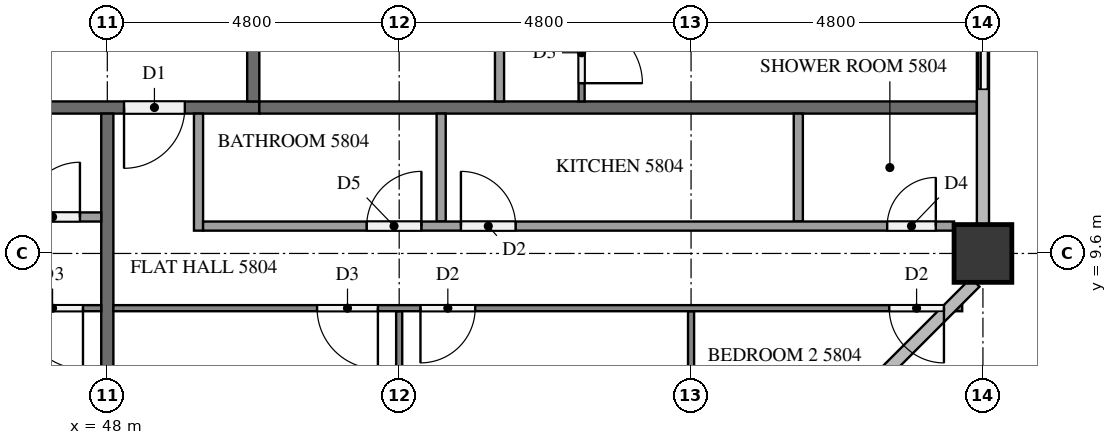
"""IFC4 building model, lengths in metres.
Left out: names, types, materials, properties, quantities, classifications, styles, units other than length and angle.
Written with IfcOpenShell. Run it as: python <this file> out.ifc"""

import sys

from ifc_helpers import new_model, si_unit, direction, frame, frame_2d, origin, origin_2d, place, context, subcontext, project, spatial, rectangle, extrude, element, fill, save


model = new_model("IFC4")
c1 = context("Model", 3, precision=1e-05, world=origin(), true_north=direction((0.0, 1.0)))
c2 = subcontext(c1, "Body", "Model", "MODEL_VIEW")
j1 = project(units=[si_unit("LENGTHUNIT", "METRE"), si_unit("PLANEANGLEUNIT", "RADIAN")], contexts=[c1])
p1 = place(None, origin())
s1 = spatial("IfcSite", under=j1, at=p1, CompositionType="ELEMENT")
p2 = place(p1, origin())
s2 = spatial("IfcBuilding", under=s1, at=p2, CompositionType="ELEMENT")
p3 = place(p2, frame((0.0, 0.0, 222.8)))
s3 = spatial("IfcBuildingStorey", under=s2, at=p3, CompositionType="ELEMENT", Elevation=222.8)
p4 = place(p3, frame((62.4, 9.6, 0.0), z_axis=(0.0, 0.0, 1.0), x_axis=(1.0, 0.0, 0.0)))
e1 = element("IfcColumn", 1, at=p4, inside=s3, PredefinedType="COLUMN", context=c2, shape_type="SweptSolid", body=[
    extrude(rectangle(XDim=0.95, YDim=0.95, at=origin_2d()), origin(), (0.0, 0.0, 1.0), 3.2),
])
p5 = place(p3, frame((62.4, 12.0, 0.0), z_axis=(0.0, 0.0, 1.0), x_axis=(0.0, 1.0, 0.0)))
e2 = element("IfcWall", 2, at=p5, inside=s3, PredefinedType="SOLIDWALL", context=c2, shape_type="SweptSolid", body=[
    extrude(rectangle(XDim=2.4, YDim=0.15, at=frame_2d((1.2, 0.0))), origin(), (0.0, 0.0, 1.0), 3.2),
])
p6 = place(p5, frame((0.3, 0.0, 0.0)))
e3 = element("IfcOpeningElement", 3, at=p6, cuts=e2, PredefinedType="OPENING", context=c2, shape_type="SweptSolid", body=[
    extrude(rectangle(XDim=1.8, YDim=2.4, at=frame_2d((0.9, 1.2))), frame((0.0, 0.085, 0.0), z_axis=(0.0, -1.0, 0.0), x_axis=(1.0, 0.0, 0.0)), (0.0, 0.0, 1.0), 0.17),
])
p7 = place(p3, frame((50.5, 12.0, 0.0), z_axis=(0.0, 0.0, 1.0), x_axis=(-1.0, 0.0, 0.0)))
e4 = element("IfcWall", 4, at=p7, inside=s3, PredefinedType="PARTITIONING", context=c2, shape_type="SweptSolid", body=[
    extrude(rectangle(XDim=38.6, YDim=0.2, at=frame_2d((19.3, 0.0))), origin(), (0.0, 0.0, 1.0), 3.2),
])
p8 = place(p7, frame((36.375, 0.0, 0.0)))
e5 = element("IfcOpeningElement", 5, at=p8, cuts=e4, PredefinedType="OPENING", context=c2, shape_type="SweptSolid", body=[
    extrude(rectangle(XDim=1.0, YDim=2.1, at=frame_2d((0.5, 1.05))), frame((0.0, 0.11, 0.0), z_axis=(0.0, -1.0, 0.0), x_axis=(1.0, 0.0, 0.0)), (0.0, 0.0, 1.0), 0.22),
])
p9 = place(p7, frame((34.825, 0.0, 0.0)))
e6 = element("IfcOpeningElement", 6, at=p9, cuts=e4, PredefinedType="OPENING", context=c2, shape_type="SweptSolid", body=[
    extrude(rectangle(XDim=1.0, YDim=2.1, at=frame_2d((0.5, 1.05))), frame((0.0, 0.11, 0.0), z_axis=(0.0, -1.0, 0.0), x_axis=(1.0, 0.0, 0.0)), (0.0, 0.0, 1.0), 0.22),
])
p10 = place(p7, frame((20.375, 0.0, 0.0)))
e7 = element("IfcOpeningElement", 7, at=p10, cuts=e4, PredefinedType="OPENING", context=c2, shape_type="SweptSolid", body=[
    extrude(rectangle(XDim=1.1, YDim=2.1, at=frame_2d((0.55, 1.05))), frame((0.0, 0.11, 0.0), z_axis=(0.0, -1.0, 0.0), x_axis=(1.0, 0.0, 0.0)), (0.0, 0.0, 1.0), 0.22),
])
p11 = place(p7, frame((1.225, 0.0, 0.0)))
e8 = element("IfcOpeningElement", 8, at=p11, cuts=e4, PredefinedType="OPENING", context=c2, shape_type="SweptSolid", body=[
    extrude(rectangle(XDim=1.0, YDim=2.1, at=frame_2d((0.5, 1.05))), frame((0.0, 0.11, 0.0), z_axis=(0.0, -1.0, 0.0), x_axis=(1.0, 0.0, 0.0)), (0.0, 0.0, 1.0), 0.22),
])
p12 = place(p3, frame((50.4, 40.7, 0.0), z_axis=(0.0, 0.0, 1.0), x_axis=(0.0, -1.0, 0.0)))
e9 = element("IfcWall", 9, at=p12, inside=s3, PredefinedType="PARTITIONING", context=c2, shape_type="SweptSolid", body=[
    extrude(rectangle(XDim=28.6, YDim=0.2, at=frame_2d((14.3, 0.0))), origin(), (0.0, 0.0, 1.0), 3.2),
])
p13 = place(p12, frame((21.775, 0.0, 0.0)))
e10 = element("IfcOpeningElement", 10, at=p13, cuts=e9, PredefinedType="OPENING", context=c2, shape_type="SweptSolid", body=[
    extrude(rectangle(XDim=1.0, YDim=2.1, at=frame_2d((0.5, 1.05))), frame((0.0, 0.11, 0.0), z_axis=(0.0, -1.0, 0.0), x_axis=(1.0, 0.0, 0.0)), (0.0, 0.0, 1.0), 0.22),
])
p14 = place(p12, frame((7.375, 0.0, 0.0)))
e11 = element("IfcOpeningElement", 11, at=p14, cuts=e9, PredefinedType="OPENING", context=c2, shape_type="SweptSolid", body=[
    extrude(rectangle(XDim=1.0, YDim=2.1, at=frame_2d((0.5, 1.05))), frame((0.0, 0.11, 0.0), z_axis=(0.0, -1.0, 0.0), x_axis=(1.0, 0.0, 0.0)), (0.0, 0.0, 1.0), 0.22),
])
p15 = place(p12, frame((0.175, 0.0, 0.0)))
e12 = element("IfcOpeningElement", 12, at=p15, cuts=e9, PredefinedType="OPENING", context=c2, shape_type="SweptSolid", body=[
    extrude(rectangle(XDim=1.0, YDim=2.1, at=frame_2d((0.5, 1.05))), frame((0.0, 0.11, 0.0), z_axis=(0.0, -1.0, 0.0), x_axis=(1.0, 0.0, 0.0)), (0.0, 0.0, 1.0), 0.22),
])
p16 = place(p3, frame((48.0, 11.9, 0.0), z_axis=(0.0, 0.0, 1.0), x_axis=(0.0, -1.0, 0.0)))
e13 = element("IfcWall", 13, at=p16, inside=s3, PredefinedType="PARTITIONING", context=c2, shape_type="SweptSolid", body=[
    extrude(rectangle(XDim=6.775, YDim=0.2, at=frame_2d((3.387, 0.0))), origin(), (0.0, 0.0, 1.0), 3.2),
])
p17 = place(p3, frame((50.5, 12.0, 0.0), z_axis=(0.0, 0.0, 1.0), x_axis=(1.0, 0.0, 0.0)))
e14 = element("IfcWall", 14, at=p17, inside=s3, PredefinedType="PARTITIONING", context=c2, shape_type="SweptSolid", body=[
    extrude(rectangle(XDim=11.8, YDim=0.2, at=frame_2d((5.9, 0.0))), origin(), (0.0, 0.0, 1.0), 3.2),
])
p18 = place(p3, frame((47.9, 8.7, 0.0), z_axis=(0.0, 0.0, 1.0), x_axis=(-1.0, 0.0, 0.0)))
e15 = element("IfcWall", 15, at=p18, inside=s3, PredefinedType="PARTITIONING", context=c2, shape_type="SweptSolid", body=[
    extrude(rectangle(XDim=19.0, YDim=0.1, at=frame_2d((9.5, 0.0))), origin(), (0.0, 0.0, 1.0), 3.2),
])
p19 = place(p18, frame((17.8, 0.0, 0.0)))
e16 = element("IfcOpeningElement", 16, at=p19, cuts=e15, PredefinedType="OPENING", context=c2, shape_type="SweptSolid", body=[
    extrude(rectangle(XDim=0.9, YDim=2.1, at=frame_2d((0.45, 1.05))), frame((0.0, 0.06, 0.0), z_axis=(0.0, -1.0, 0.0), x_axis=(1.0, 0.0, 0.0)), (0.0, 0.0, 1.0), 0.12),
])
p20 = place(p18, frame((9.85, 0.0, 0.0)))
e17 = element("IfcOpeningElement", 17, at=p20, cuts=e15, PredefinedType="OPENING", context=c2, shape_type="SweptSolid", body=[
    extrude(rectangle(XDim=0.9, YDim=2.1, at=frame_2d((0.45, 1.05))), frame((0.0, 0.06, 0.0), z_axis=(0.0, -1.0, 0.0), x_axis=(1.0, 0.0, 0.0)), (0.0, 0.0, 1.0), 0.12),
])
p21 = place(p18, frame((8.25, 0.0, 0.0)))
e18 = element("IfcOpeningElement", 18, at=p21, cuts=e15, PredefinedType="OPENING", context=c2, shape_type="SweptSolid", body=[
    extrude(rectangle(XDim=0.9, YDim=2.1, at=frame_2d((0.45, 1.05))), frame((0.0, 0.06, 0.0), z_axis=(0.0, -1.0, 0.0), x_axis=(1.0, 0.0, 0.0)), (0.0, 0.0, 1.0), 0.12),
])
p22 = place(p18, frame((0.3, 0.0, 0.0)))
e19 = element("IfcOpeningElement", 19, at=p22, cuts=e15, PredefinedType="OPENING", context=c2, shape_type="SweptSolid", body=[
    extrude(rectangle(XDim=1.0, YDim=2.1, at=frame_2d((0.5, 1.05))), frame((0.0, 0.06, 0.0), z_axis=(0.0, -1.0, 0.0), x_axis=(1.0, 0.0, 0.0)), (0.0, 0.0, 1.0), 0.12),
])
p23 = place(p3, frame((30.375, 10.2, 0.0), z_axis=(0.0, 0.0, 1.0), x_axis=(1.0, 0.0, 0.0)))
e20 = element("IfcWall", 20, at=p23, inside=s3, PredefinedType="PARTITIONING", context=c2, shape_type="SweptSolid", body=[
    extrude(rectangle(XDim=17.525, YDim=0.15, at=frame_2d((8.762, 0.0))), origin(), (0.0, 0.0, 1.0), 3.2),
])
p24 = place(p23, frame((0.3, 0.0, 0.0)))
e21 = element("IfcOpeningElement", 21, at=p24, cuts=e20, PredefinedType="OPENING", context=c2, shape_type="SweptSolid", body=[
    extrude(rectangle(XDim=0.9, YDim=2.1, at=frame_2d((0.45, 1.05))), frame((0.0, 0.085, 0.0), z_axis=(0.0, -1.0, 0.0), x_axis=(1.0, 0.0, 0.0)), (0.0, 0.0, 1.0), 0.17),
])
p25 = place(p23, frame((8.733, 0.0, 0.0)))
e22 = element("IfcOpeningElement", 22, at=p25, cuts=e20, PredefinedType="OPENING", context=c2, shape_type="SweptSolid", body=[
    extrude(rectangle(XDim=0.8, YDim=2.1, at=frame_2d((0.4, 1.05))), frame((0.0, 0.085, 0.0), z_axis=(0.0, -1.0, 0.0), x_axis=(1.0, 0.0, 0.0)), (0.0, 0.0, 1.0), 0.17),
])
p26 = place(p23, frame((10.183, 0.0, 0.0)))
e23 = element("IfcOpeningElement", 23, at=p26, cuts=e20, PredefinedType="OPENING", context=c2, shape_type="SweptSolid", body=[
    extrude(rectangle(XDim=0.8, YDim=2.1, at=frame_2d((0.4, 1.05))), frame((0.0, 0.085, 0.0), z_axis=(0.0, -1.0, 0.0), x_axis=(1.0, 0.0, 0.0)), (0.0, 0.0, 1.0), 0.17),
])
p27 = place(p23, frame((16.275, 0.0, 0.0)))
e24 = element("IfcOpeningElement", 24, at=p27, cuts=e20, PredefinedType="OPENING", context=c2, shape_type="SweptSolid", body=[
    extrude(rectangle(XDim=0.9, YDim=2.1, at=frame_2d((0.45, 1.05))), frame((0.0, 0.085, 0.0), z_axis=(0.0, -1.0, 0.0), x_axis=(1.0, 0.0, 0.0)), (0.0, 0.0, 1.0), 0.17),
])
p28 = place(p3, frame((52.8, 8.65, 0.0), z_axis=(0.0, 0.0, 1.0), x_axis=(0.0, -1.0, 0.0)))
e25 = element("IfcWall", 25, at=p28, inside=s3, PredefinedType="PARTITIONING", context=c2, shape_type="SweptSolid", body=[
    extrude(rectangle(XDim=3.75, YDim=0.1, at=frame_2d((1.875, 0.0))), origin(), (0.0, 0.0, 1.0), 3.2),
])
p29 = place(p3, frame((57.6, 8.65, 0.0), z_axis=(0.0, 0.0, 1.0), x_axis=(0.0, -1.0, 0.0)))
e26 = element("IfcWall", 26, at=p29, inside=s3, PredefinedType="PARTITIONING", context=c2, shape_type="SweptSolid", body=[
    extrude(rectangle(XDim=3.375, YDim=0.1, at=frame_2d((1.688, 0.0))), origin(), (0.0, 0.0, 1.0), 3.2),
])
p30 = place(p3, frame((62.059, 8.7, 0.0), z_axis=(0.0, 0.0, 1.0), x_axis=(-1.0, 0.0, 0.0)))
e27 = element("IfcWall", 27, at=p30, inside=s3, PredefinedType="PARTITIONING", context=c2, shape_type="SweptSolid", body=[
    extrude(rectangle(XDim=13.959, YDim=0.1, at=frame_2d((6.979, 0.0))), origin(), (0.0, 0.0, 1.0), 3.2),
])
p31 = place(p30, frame((9.609, 0.0, 0.0)))
e28 = element("IfcOpeningElement", 28, at=p31, cuts=e27, PredefinedType="OPENING", context=c2, shape_type="SweptSolid", body=[
    extrude(rectangle(XDim=1.0, YDim=2.1, at=frame_2d((0.5, 1.05))), frame((0.0, 0.06, 0.0), z_axis=(0.0, -1.0, 0.0), x_axis=(1.0, 0.0, 0.0)), (0.0, 0.0, 1.0), 0.12),
])
p32 = place(p30, frame((8.009, 0.0, 0.0)))
e29 = element("IfcOpeningElement", 29, at=p32, cuts=e27, PredefinedType="OPENING", context=c2, shape_type="SweptSolid", body=[
    extrude(rectangle(XDim=0.9, YDim=2.1, at=frame_2d((0.45, 1.05))), frame((0.0, 0.06, 0.0), z_axis=(0.0, -1.0, 0.0), x_axis=(1.0, 0.0, 0.0)), (0.0, 0.0, 1.0), 0.12),
])
p33 = place(p30, frame((0.3, 0.0, 0.0)))
e30 = element("IfcOpeningElement", 30, at=p33, cuts=e27, PredefinedType="OPENING", context=c2, shape_type="SweptSolid", body=[
    extrude(rectangle(XDim=0.9, YDim=2.1, at=frame_2d((0.45, 1.05))), frame((0.0, 0.06, 0.0), z_axis=(0.0, -1.0, 0.0), x_axis=(1.0, 0.0, 0.0)), (0.0, 0.0, 1.0), 0.12),
])
for number, where, z_axis, x_axis in (
    (31, (53.49, 11.9, 0.0), (0.0, 0.0, 1.0), (0.0, -1.0, 0.0)),
    (32, (59.364, 11.9, 0.0), (0.0, 0.0, 1.0), (0.0, -1.0, 0.0)),
):
    element("IfcWall", number, at=place(p3, frame(where, z_axis=z_axis, x_axis=x_axis)), inside=s3, PredefinedType="PARTITIONING", context=c2, shape_type="SweptSolid", body=[
        extrude(rectangle(XDim=1.775, YDim=0.15, at=frame_2d((0.887, 0.0))), origin(), (0.0, 0.0, 1.0), 3.2),
    ])
p34 = place(p3, frame((49.5, 11.9, 0.0), z_axis=(0.0, 0.0, 1.0), x_axis=(0.0, -1.0, 0.0)))
e33 = element("IfcWall", 33, at=p34, inside=s3, PredefinedType="PARTITIONING", context=c2, shape_type="SweptSolid", body=[
    extrude(rectangle(XDim=1.925, YDim=0.15, at=frame_2d((0.962, 0.0))), origin(), (0.0, 0.0, 1.0), 3.2),
])
p35 = place(p3, frame((49.575, 10.05, 0.0), z_axis=(0.0, 0.0, 1.0), x_axis=(1.0, 0.0, 0.0)))
e34 = element("IfcWall", 34, at=p35, inside=s3, PredefinedType="PARTITIONING", context=c2, shape_type="SweptSolid", body=[
    extrude(rectangle(XDim=12.35, YDim=0.15, at=frame_2d((6.175, 0.0))), origin(), (0.0, 0.0, 1.0), 3.2),
])
p36 = place(p35, frame((2.69, 0.0, 0.0)))
e35 = element("IfcOpeningElement", 35, at=p36, cuts=e34, PredefinedType="OPENING", context=c2, shape_type="SweptSolid", body=[
    extrude(rectangle(XDim=0.9, YDim=2.1, at=frame_2d((0.45, 1.05))), frame((0.0, 0.085, 0.0), z_axis=(0.0, -1.0, 0.0), x_axis=(1.0, 0.0, 0.0)), (0.0, 0.0, 1.0), 0.17),
])
p37 = place(p35, frame((4.24, 0.0, 0.0)))
e36 = element("IfcOpeningElement", 36, at=p37, cuts=e34, PredefinedType="OPENING", context=c2, shape_type="SweptSolid", body=[
    extrude(rectangle(XDim=0.9, YDim=2.1, at=frame_2d((0.45, 1.05))), frame((0.0, 0.085, 0.0), z_axis=(0.0, -1.0, 0.0), x_axis=(1.0, 0.0, 0.0)), (0.0, 0.0, 1.0), 0.17),
])
p38 = place(p35, frame((11.25, 0.0, 0.0)))
e37 = element("IfcOpeningElement", 37, at=p38, cuts=e34, PredefinedType="OPENING", context=c2, shape_type="SweptSolid", body=[
    extrude(rectangle(XDim=0.8, YDim=2.1, at=frame_2d((0.4, 1.05))), frame((0.0, 0.085, 0.0), z_axis=(0.0, -1.0, 0.0), x_axis=(1.0, 0.0, 0.0)), (0.0, 0.0, 1.0), 0.17),
])
p39 = place(p3, frame((55.8, 19.1, 0.0), z_axis=(0.0, 0.0, 1.0), x_axis=(0.0, -1.0, 0.0)))
e38 = element("IfcWall", 38, at=p39, inside=s3, PredefinedType="PARTITIONING", context=c2, shape_type="SweptSolid", body=[
    extrude(rectangle(XDim=7.0, YDim=0.1, at=frame_2d((3.5, 0.0))), origin(), (0.0, 0.0, 1.0), 3.2),
])
p40 = place(p39, frame((5.7, 0.0, 0.0)))
e39 = element("IfcOpeningElement", 39, at=p40, cuts=e38, PredefinedType="OPENING", context=c2, shape_type="SweptSolid", body=[
    extrude(rectangle(XDim=1.0, YDim=2.1, at=frame_2d((0.5, 1.05))), frame((0.0, 0.06, 0.0), z_axis=(0.0, -1.0, 0.0), x_axis=(1.0, 0.0, 0.0)), (0.0, 0.0, 1.0), 0.12),
])
p41 = place(p3, frame((54.45, 12.1, 0.0), z_axis=(0.0, 0.0, 1.0), x_axis=(0.0, 1.0, 0.0)))
e40 = element("IfcWall", 40, at=p41, inside=s3, PredefinedType="PARTITIONING", context=c2, shape_type="SweptSolid", body=[
    extrude(rectangle(XDim=5.525, YDim=0.15, at=frame_2d((2.762, 0.0))), origin(), (0.0, 0.0, 1.0), 3.2),
])
p42 = place(p41, frame((2.535, 0.0, 0.0)))
e41 = element("IfcOpeningElement", 41, at=p42, cuts=e40, PredefinedType="OPENING", context=c2, shape_type="SweptSolid", body=[
    extrude(rectangle(XDim=0.9, YDim=2.1, at=frame_2d((0.45, 1.05))), frame((0.0, 0.085, 0.0), z_axis=(0.0, -1.0, 0.0), x_axis=(1.0, 0.0, 0.0)), (0.0, 0.0, 1.0), 0.17),
])
p43 = place(p41, frame((1.085, 0.0, 0.0)))
e42 = element("IfcOpeningElement", 42, at=p43, cuts=e40, PredefinedType="OPENING", context=c2, shape_type="SweptSolid", body=[
    extrude(rectangle(XDim=0.8, YDim=2.1, at=frame_2d((0.4, 1.05))), frame((0.0, 0.085, 0.0), z_axis=(0.0, -1.0, 0.0), x_axis=(1.0, 0.0, 0.0)), (0.0, 0.0, 1.0), 0.17),
])
p44 = place(p6, origin())
e43 = element("IfcDoor", 43, at=p44, inside=s3, OperationType="SLIDING_TO_LEFT", PredefinedType="DOOR", context=c2, shape_type="SweptSolid", body=[
    extrude(rectangle(XDim=1.8, YDim=2.4, at=frame_2d((0.9, 1.2))), frame((0.0, 0.025, 0.0), z_axis=(0.0, -1.0, 0.0), x_axis=(1.0, 0.0, 0.0)), (0.0, 0.0, 1.0), 0.05),
])
fill(e3, e43)
p45 = place(p11, origin())
e44 = element("IfcDoor", 44, at=p45, inside=s3, OperationType="SINGLE_SWING_RIGHT", PredefinedType="DOOR", context=c2, shape_type="SweptSolid", body=[
    extrude(rectangle(XDim=1.0, YDim=2.1, at=frame_2d((0.5, 1.05))), frame((0.0, 0.025, 0.0), z_axis=(0.0, -1.0, 0.0), x_axis=(1.0, 0.0, 0.0)), (0.0, 0.0, 1.0), 0.05),
])
fill(e8, e44)
p46 = place(p22, origin())
e45 = element("IfcDoor", 45, at=p46, inside=s3, OperationType="SINGLE_SWING_LEFT", PredefinedType="DOOR", context=c2, shape_type="SweptSolid", body=[
    extrude(rectangle(XDim=1.0, YDim=2.1, at=frame_2d((0.5, 1.05))), frame((0.0, 0.025, 0.0), z_axis=(0.0, -1.0, 0.0), x_axis=(1.0, 0.0, 0.0)), (0.0, 0.0, 1.0), 0.05),
])
fill(e19, e45)
p47 = place(p27, origin())
e46 = element("IfcDoor", 46, at=p47, inside=s3, OperationType="SINGLE_SWING_RIGHT", PredefinedType="DOOR", context=c2, shape_type="SweptSolid", body=[
    extrude(rectangle(XDim=0.9, YDim=2.1, at=frame_2d((0.45, 1.05))), frame((0.0, 0.025, 0.0), z_axis=(0.0, -1.0, 0.0), x_axis=(1.0, 0.0, 0.0)), (0.0, 0.0, 1.0), 0.05),
])
fill(e24, e46)
p48 = place(p31, origin())
e47 = element("IfcDoor", 47, at=p48, inside=s3, OperationType="SINGLE_SWING_LEFT", PredefinedType="DOOR", context=c2, shape_type="SweptSolid", body=[
    extrude(rectangle(XDim=1.0, YDim=2.1, at=frame_2d((0.5, 1.05))), frame((0.0, 0.025, 0.0), z_axis=(0.0, -1.0, 0.0), x_axis=(1.0, 0.0, 0.0)), (0.0, 0.0, 1.0), 0.05),
])
fill(e28, e47)
p49 = place(p32, origin())
e48 = element("IfcDoor", 48, at=p49, inside=s3, OperationType="SINGLE_SWING_RIGHT", PredefinedType="DOOR", context=c2, shape_type="SweptSolid", body=[
    extrude(rectangle(XDim=0.9, YDim=2.1, at=frame_2d((0.45, 1.05))), frame((0.0, 0.025, 0.0), z_axis=(0.0, -1.0, 0.0), x_axis=(1.0, 0.0, 0.0)), (0.0, 0.0, 1.0), 0.05),
])
fill(e29, e48)
p50 = place(p33, origin())
e49 = element("IfcDoor", 49, at=p50, inside=s3, OperationType="SINGLE_SWING_LEFT", PredefinedType="DOOR", context=c2, shape_type="SweptSolid", body=[
    extrude(rectangle(XDim=0.9, YDim=2.1, at=frame_2d((0.45, 1.05))), frame((0.0, 0.025, 0.0), z_axis=(0.0, -1.0, 0.0), x_axis=(1.0, 0.0, 0.0)), (0.0, 0.0, 1.0), 0.05),
])
fill(e30, e49)
p51 = place(p36, origin())
e50 = element("IfcDoor", 50, at=p51, inside=s3, OperationType="SINGLE_SWING_RIGHT", PredefinedType="DOOR", context=c2, shape_type="SweptSolid", body=[
    extrude(rectangle(XDim=0.9, YDim=2.1, at=frame_2d((0.45, 1.05))), frame((0.0, 0.025, 0.0), z_axis=(0.0, -1.0, 0.0), x_axis=(1.0, 0.0, 0.0)), (0.0, 0.0, 1.0), 0.05),
])
fill(e35, e50)
p52 = place(p37, origin())
e51 = element("IfcDoor", 51, at=p52, inside=s3, OperationType="SINGLE_SWING_LEFT", PredefinedType="DOOR", context=c2, shape_type="SweptSolid", body=[
    extrude(rectangle(XDim=0.9, YDim=2.1, at=frame_2d((0.45, 1.05))), frame((0.0, 0.025, 0.0), z_axis=(0.0, -1.0, 0.0), x_axis=(1.0, 0.0, 0.0)), (0.0, 0.0, 1.0), 0.05),
])
fill(e36, e51)
p53 = place(p38, origin())
e52 = element("IfcDoor", 52, at=p53, inside=s3, OperationType="SINGLE_SWING_RIGHT", PredefinedType="DOOR", context=c2, shape_type="SweptSolid", body=[
    extrude(rectangle(XDim=0.8, YDim=2.1, at=frame_2d((0.4, 1.05))), frame((0.0, 0.025, 0.0), z_axis=(0.0, -1.0, 0.0), x_axis=(1.0, 0.0, 0.0)), (0.0, 0.0, 1.0), 0.05),
])
fill(e37, e52)
p54 = place(p40, origin())
e53 = element("IfcDoor", 53, at=p54, inside=s3, OperationType="SINGLE_SWING_RIGHT", PredefinedType="DOOR", context=c2, shape_type="SweptSolid", body=[
    extrude(rectangle(XDim=1.0, YDim=2.1, at=frame_2d((0.5, 1.05))), frame((0.0, 0.025, 0.0), z_axis=(0.0, -1.0, 0.0), x_axis=(1.0, 0.0, 0.0)), (0.0, 0.0, 1.0), 0.05),
])
fill(e39, e53)
save(model, sys.argv[1])
